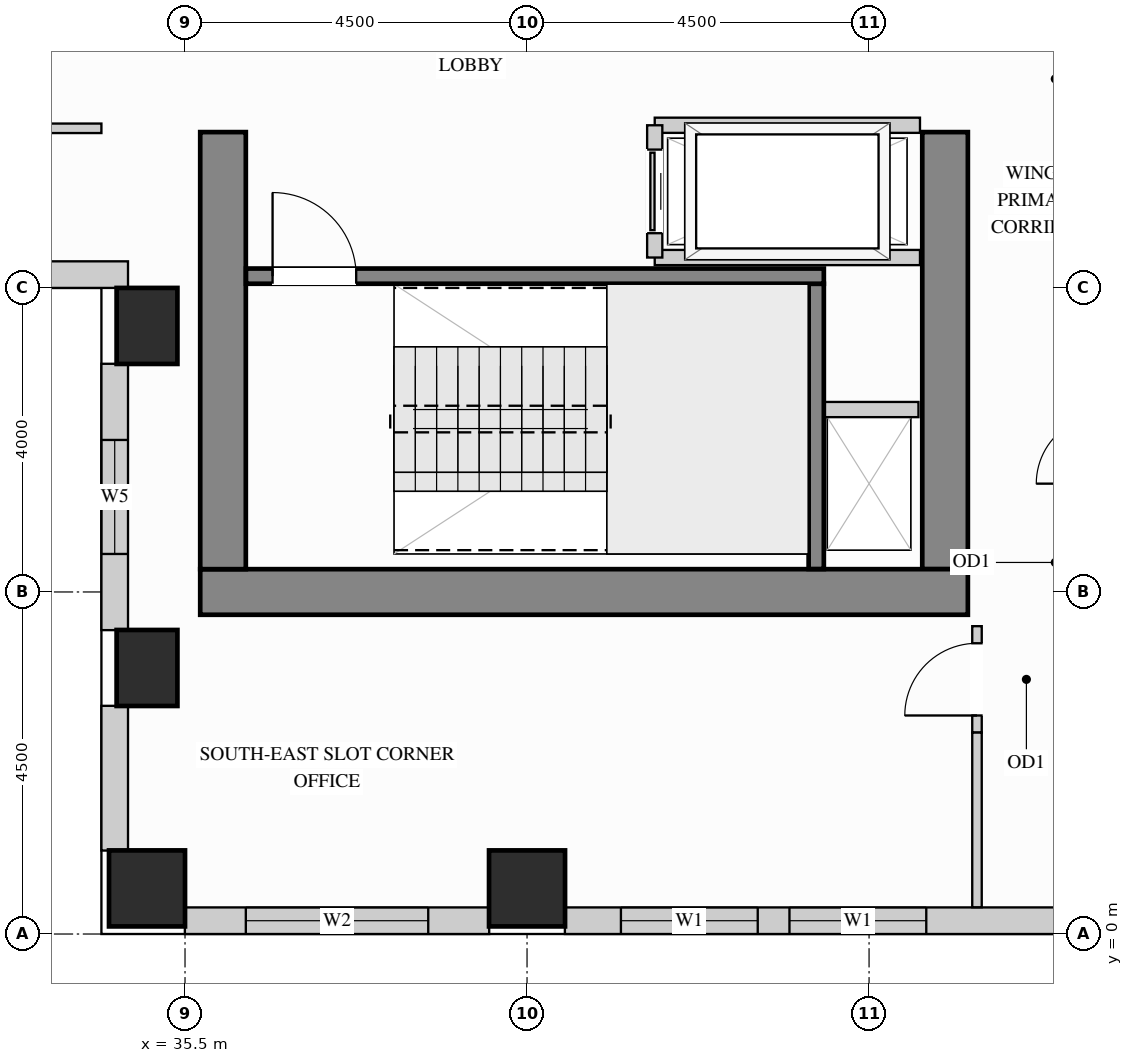
"""IFC4 building model, lengths in metres.
Left out: names, types, materials, properties, quantities, classifications, styles, units other than length and angle.
Written with IfcOpenShell. Run it as: python <this file> out.ifc"""

import sys

from ifc_helpers import new_model, si_unit, direction, frame, frame_2d, origin, origin_2d, place, context, subcontext, project, spatial, rectangle, extrude, source, transform, mapped, element, fill, save


model = new_model("IFC4")
c1 = context("Model", 3, precision=1e-05, world=origin(), true_north=direction((0.0, 1.0)))
c2 = subcontext(c1, "Body", "Model", "MODEL_VIEW")
j1 = project(units=[si_unit("LENGTHUNIT", "METRE"), si_unit("PLANEANGLEUNIT", "RADIAN")], contexts=[c1])
p1 = place(None, origin())
s1 = spatial("IfcSite", under=j1, at=p1, CompositionType="ELEMENT")
p2 = place(p1, origin())
s2 = spatial("IfcBuilding", under=s1, at=p2, CompositionType="ELEMENT")
p3 = place(p2, frame((0.0, 0.0, 157.5)))
s3 = spatial("IfcBuildingStorey", under=s2, at=p3, CompositionType="ELEMENT", Elevation=157.5)
m1 = source(origin(), c2, "Body", "SweptSolid", [
    extrude(rectangle(XDim=0.8, YDim=1.0, at=origin_2d()), origin(), (0.0, 0.0, 1.0), 3.4),
])
for number, where, z_axis, x_axis in (
    (1, (35.0, 3.5, 0.0), (0.0, 0.0, 1.0), (1.0, 0.0, 0.0)),
    (2, (35.0, 8.0, 0.0), (0.0, 0.0, 1.0), (1.0, 0.0, 0.0)),
):
    element("IfcColumn", number, at=place(p3, frame(where, z_axis=z_axis, x_axis=x_axis)), inside=s3, PredefinedType="COLUMN", context=c2, shape_type="MappedRepresentation", body=[
        mapped(m1, transform((0.0, 0.0, 0.0), x_axis=(1.0, 0.0, 0.0), y_axis=(0.0, 1.0, 0.0), z_axis=(0.0, 0.0, 1.0))),
    ])
m2 = source(origin(), c2, "Body", "SweptSolid", [
    extrude(rectangle(XDim=1.0, YDim=1.0, at=origin_2d()), origin(), (0.0, 0.0, 1.0), 3.4),
])
for number, where, z_axis, x_axis in (
    (3, (35.0, 0.6, 0.0), (0.0, 0.0, 1.0), (1.0, 0.0, 0.0)),
    (4, (40.0, 0.6, 0.0), (0.0, 0.0, 1.0), (1.0, 0.0, 0.0)),
):
    element("IfcColumn", number, at=place(p3, frame(where, z_axis=z_axis, x_axis=x_axis)), inside=s3, PredefinedType="COLUMN", context=c2, shape_type="MappedRepresentation", body=[
        mapped(m2, transform((0.0, 0.0, 0.0), x_axis=(1.0, 0.0, 0.0), y_axis=(0.0, 1.0, 0.0), z_axis=(0.0, 0.0, 1.0))),
    ])
m3 = source(origin(), c2, "Body", "SweptSolid", [
    extrude(rectangle(XDim=5.75, YDim=0.6, at=frame_2d((2.875, 0.0))), origin(), (0.0, 0.0, 1.0), 3.4),
])
p4 = place(p3, frame((45.5, 4.8, 0.0), z_axis=(0.0, 0.0, 1.0), x_axis=(0.0, 1.0, 0.0)))
e5 = element("IfcWall", 5, at=p4, inside=s3, PredefinedType="SHEAR", context=c2, shape_type="MappedRepresentation", body=[
    mapped(m3, transform((0.0, 0.0, 0.0), x_axis=(1.0, 0.0, 0.0), y_axis=(0.0, 1.0, 0.0), z_axis=(0.0, 0.0, 1.0))),
])
m4 = source(origin(), c2, "Body", "SweptSolid", [
    extrude(rectangle(XDim=10.1, YDim=0.6, at=frame_2d((5.05, 0.0))), origin(), (0.0, 0.0, 1.0), 3.4),
])
p5 = place(p3, frame((35.7, 4.5, 0.0), z_axis=(0.0, 0.0, 1.0), x_axis=(1.0, 0.0, 0.0)))
e6 = element("IfcWall", 6, at=p5, inside=s3, PredefinedType="SHEAR", context=c2, shape_type="MappedRepresentation", body=[
    mapped(m4, transform((0.0, 0.0, 0.0), x_axis=(1.0, 0.0, 0.0), y_axis=(0.0, 1.0, 0.0), z_axis=(0.0, 0.0, 1.0))),
])
p6 = place(p3, frame((36.0, 4.8, 0.0), z_axis=(0.0, 0.0, 1.0), x_axis=(0.0, 1.0, 0.0)))
e7 = element("IfcWall", 7, at=p6, inside=s3, PredefinedType="SHEAR", context=c2, shape_type="MappedRepresentation", body=[
    mapped(m3, transform((0.0, 0.0, 0.0), x_axis=(1.0, 0.0, 0.0), y_axis=(0.0, 1.0, 0.0), z_axis=(0.0, 0.0, 1.0))),
])
p7 = place(p3, frame((30.898, 8.675, 0.0), z_axis=(0.0, 0.0, 1.0), x_axis=(1.0, 0.0, 0.0)))
e8 = element("IfcWall", 8, at=p7, inside=s3, PredefinedType="SOLIDWALL", context=c2, shape_type="SweptSolid", body=[
    extrude(rectangle(XDim=3.852, YDim=0.35, at=frame_2d((1.926, 0.0))), origin(), (0.0, 0.0, 1.0), 3.385),
])
p8 = place(p7, frame((1.176, 0.0, 0.78)))
e9 = element("IfcOpeningElement", 9, at=p8, cuts=e8, PredefinedType="OPENING", context=c2, shape_type="SweptSolid", body=[
    extrude(rectangle(XDim=1.5, YDim=2.0, at=frame_2d((0.75, 1.0))), frame((0.0, 0.185, 0.0), z_axis=(0.0, -1.0, 0.0), x_axis=(1.0, 0.0, 0.0)), (0.0, 0.0, 1.0), 0.37),
])
p9 = place(p3, frame((34.575, 7.502, 0.0), z_axis=(0.0, 0.0, 1.0), x_axis=(0.0, -1.0, 0.0)))
e10 = element("IfcWall", 10, at=p9, inside=s3, PredefinedType="SOLIDWALL", context=c2, shape_type="SweptSolid", body=[
    extrude(rectangle(XDim=3.504, YDim=0.35, at=frame_2d((1.752, 0.0))), origin(), (0.0, 0.0, 1.0), 2.612),
])
p10 = place(p9, frame((1.002, 0.0, 0.78)))
e11 = element("IfcOpeningElement", 11, at=p10, cuts=e10, PredefinedType="OPENING", context=c2, shape_type="SweptSolid", body=[
    extrude(rectangle(XDim=1.5, YDim=1.652, at=frame_2d((0.75, 0.826))), frame((0.0, 0.185, 0.0), z_axis=(0.0, -1.0, 0.0), x_axis=(1.0, 0.0, 0.0)), (0.0, 0.0, 1.0), 0.37),
])
m5 = source(origin(), c2, "Body", "SweptSolid", [
    extrude(rectangle(XDim=1.904, YDim=0.35, at=frame_2d((0.952, 0.0))), origin(), (0.0, 0.0, 1.0), 2.612),
])
p11 = place(p3, frame((34.575, 3.002, 0.0), z_axis=(0.0, 0.0, 1.0), x_axis=(0.0, -1.0, 0.0)))
e12 = element("IfcWall", 12, at=p11, inside=s3, PredefinedType="SOLIDWALL", context=c2, shape_type="MappedRepresentation", body=[
    mapped(m5, transform((0.0, 0.0, 0.0), x_axis=(1.0, 0.0, 0.0), y_axis=(0.0, 1.0, 0.0), z_axis=(0.0, 0.0, 1.0))),
])
p12 = place(p3, frame((35.498, 0.175, 0.0), z_axis=(0.0, 0.0, 1.0), x_axis=(1.0, 0.0, 0.0)))
e13 = element("IfcWall", 13, at=p12, inside=s3, PredefinedType="SOLIDWALL", context=c2, shape_type="SweptSolid", body=[
    extrude(rectangle(XDim=4.004, YDim=0.35, at=frame_2d((2.002, 0.0))), origin(), (0.0, 0.0, 1.0), 2.612),
])
p13 = place(p12, frame((0.802, 0.0, 0.78)))
e14 = element("IfcOpeningElement", 14, at=p13, cuts=e13, PredefinedType="OPENING", context=c2, shape_type="SweptSolid", body=[
    extrude(rectangle(XDim=2.4, YDim=1.652, at=frame_2d((1.2, 0.826))), frame((0.0, 0.185, 0.0), z_axis=(0.0, -1.0, 0.0), x_axis=(1.0, 0.0, 0.0)), (0.0, 0.0, 1.0), 0.37),
])
p14 = place(p3, frame((40.498, 0.175, 0.0), z_axis=(0.0, 0.0, 1.0), x_axis=(1.0, 0.0, 0.0)))
e15 = element("IfcWall", 15, at=p14, inside=s3, PredefinedType="SOLIDWALL", context=c2, shape_type="SweptSolid", body=[
    extrude(rectangle(XDim=6.604, YDim=0.35, at=frame_2d((3.302, 0.0))), origin(), (0.0, 0.0, 1.0), 2.612),
])
p15 = place(p14, frame((0.737, 0.0, 0.78)))
e16 = element("IfcOpeningElement", 16, at=p15, cuts=e15, PredefinedType="OPENING", context=c2, shape_type="SweptSolid", body=[
    extrude(rectangle(XDim=1.8, YDim=1.652, at=frame_2d((0.9, 0.826))), frame((0.0, 0.185, 0.0), z_axis=(0.0, -1.0, 0.0), x_axis=(1.0, 0.0, 0.0)), (0.0, 0.0, 1.0), 0.37),
])
p16 = place(p14, frame((2.955, 0.0, 0.78)))
e17 = element("IfcOpeningElement", 17, at=p16, cuts=e15, PredefinedType="OPENING", context=c2, shape_type="SweptSolid", body=[
    extrude(rectangle(XDim=1.8, YDim=1.652, at=frame_2d((0.9, 0.826))), frame((0.0, 0.185, 0.0), z_axis=(0.0, -1.0, 0.0), x_axis=(1.0, 0.0, 0.0)), (0.0, 0.0, 1.0), 0.37),
])
p17 = place(p3, frame((45.92, 2.65, 0.0), z_axis=(0.0, 0.0, 1.0), x_axis=(0.0, 1.0, 0.0)))
e18 = element("IfcWall", 18, at=p17, inside=s3, PredefinedType="PARTITIONING", context=c2, shape_type="SweptSolid", body=[
    extrude(rectangle(XDim=1.4, YDim=0.125, at=frame_2d((0.7, 0.0))), origin(), (0.0, 0.0, 1.0), 3.385),
])
p18 = place(p17, frame((0.225, 0.0, 0.0)))
e19 = element("IfcOpeningElement", 19, at=p18, cuts=e18, PredefinedType="OPENING", context=c2, shape_type="SweptSolid", body=[
    extrude(rectangle(XDim=0.95, YDim=2.15, at=frame_2d((0.475, 1.075))), frame((0.0, 0.073, 0.0), z_axis=(0.0, -1.0, 0.0), x_axis=(1.0, 0.0, 0.0)), (0.0, 0.0, 1.0), 0.145),
])
m6 = source(origin(), c2, "Body", "SweptSolid", [
    extrude(rectangle(XDim=2.298, YDim=0.125, at=frame_2d((1.149, 0.0))), origin(), (0.0, 0.0, 1.0), 3.385),
])
p19 = place(p3, frame((45.92, 0.352, 0.0), z_axis=(0.0, 0.0, 1.0), x_axis=(0.0, 1.0, 0.0)))
e20 = element("IfcWall", 20, at=p19, inside=s3, PredefinedType="PARTITIONING", context=c2, shape_type="MappedRepresentation", body=[
    mapped(m6, transform((0.0, 0.0, 0.0), x_axis=(1.0, 0.0, 0.0), y_axis=(0.0, 1.0, 0.0), z_axis=(0.0, 0.0, 1.0))),
])
p20 = place(p3, frame((26.95, 10.6, 0.0), z_axis=(0.0, 0.0, 1.0), x_axis=(1.0, 0.0, 0.0)))
e21 = element("IfcWall", 21, at=p20, inside=s3, PredefinedType="PARTITIONING", context=c2, shape_type="SweptSolid", body=[
    extrude(rectangle(XDim=7.45, YDim=0.125, at=frame_2d((3.725, 0.0))), origin(), (0.0, 0.0, 1.0), 3.385),
])
p21 = place(p20, frame((4.478, 0.0, 0.0)))
e22 = element("IfcOpeningElement", 22, at=p21, cuts=e21, PredefinedType="OPENING", context=c2, shape_type="SweptSolid", body=[
    extrude(rectangle(XDim=0.95, YDim=2.15, at=frame_2d((0.475, 1.075))), frame((0.0, 0.073, 0.0), z_axis=(0.0, -1.0, 0.0), x_axis=(1.0, 0.0, 0.0)), (0.0, 0.0, 1.0), 0.145),
])
m7 = source(origin(), c2, "Body", "SweptSolid", [
    extrude(rectangle(XDim=1.3, YDim=0.2, at=frame_2d((0.65, 0.0))), origin(), (0.0, 0.0, 1.0), 3.385),
])
p22 = place(p3, frame((43.85, 6.9, 0.0), z_axis=(0.0, 0.0, 1.0), x_axis=(1.0, 0.0, 0.0)))
e23 = element("IfcWall", 23, at=p22, inside=s3, PredefinedType="PARTITIONING", context=c2, shape_type="MappedRepresentation", body=[
    mapped(m7, transform((0.0, 0.0, 0.0), x_axis=(1.0, 0.0, 0.0), y_axis=(0.0, 1.0, 0.0), z_axis=(0.0, 0.0, 1.0))),
])
m8 = source(origin(), c2, "Body", "SweptSolid", [
    extrude(rectangle(XDim=3.49, YDim=0.2, at=frame_2d((1.745, 0.0))), origin(), (0.0, 0.0, 1.0), 3.385),
])
for number, where, z_axis, x_axis in (
    (24, (41.68, 10.64, 0.0), (0.0, 0.0, 1.0), (1.0, 0.0, 0.0)),
    (25, (41.68, 8.9, 0.0), (0.0, 0.0, 1.0), (1.0, 0.0, 0.0)),
):
    element("IfcWall", number, at=place(p3, frame(where, z_axis=z_axis, x_axis=x_axis)), inside=s3, PredefinedType="PARTITIONING", context=c2, shape_type="MappedRepresentation", body=[
        mapped(m8, transform((0.0, 0.0, 0.0), x_axis=(1.0, 0.0, 0.0), y_axis=(0.0, 1.0, 0.0), z_axis=(0.0, 0.0, 1.0))),
    ])
p23 = place(p3, frame((41.68, 8.9, 0.0), z_axis=(0.0, 0.0, 1.0), x_axis=(0.0, 1.0, 0.0)))
e26 = element("IfcWall", 26, at=p23, inside=s3, PredefinedType="PARTITIONING", context=c2, shape_type="SweptSolid", body=[
    extrude(rectangle(XDim=1.74, YDim=0.2, at=frame_2d((0.87, 0.0))), origin(), (0.0, 0.0, 1.0), 3.385),
])
p24 = place(p23, frame((0.32, 0.0, 0.0)))
e27 = element("IfcOpeningElement", 27, at=p24, cuts=e26, PredefinedType="OPENING", context=c2, shape_type="SweptSolid", body=[
    extrude(rectangle(XDim=1.1, YDim=2.2, at=frame_2d((0.55, 1.1))), frame((0.0, 0.11, 0.0), z_axis=(0.0, -1.0, 0.0), x_axis=(1.0, 0.0, 0.0)), (0.0, 0.0, 1.0), 0.22),
])
m9 = source(origin(), c2, "Body", "SweptSolid", [
    extrude(rectangle(XDim=3.753, YDim=0.2, at=frame_2d((1.876, 0.0))), origin(), (0.0, 0.0, 1.0), 3.4),
])
p25 = place(p3, frame((43.805, 4.802, 0.0), z_axis=(0.0, 0.0, 1.0), x_axis=(0.0, 1.0, 0.0)))
e28 = element("IfcWall", 28, at=p25, inside=s3, PredefinedType="SHEAR", context=c2, shape_type="MappedRepresentation", body=[
    mapped(m9, transform((0.0, 0.0, 0.0), x_axis=(1.0, 0.0, 0.0), y_axis=(0.0, 1.0, 0.0), z_axis=(0.0, 0.0, 1.0))),
])
p26 = place(p3, frame((36.302, 8.655, 0.0), z_axis=(0.0, 0.0, 1.0), x_axis=(1.0, 0.0, 0.0)))
e29 = element("IfcWall", 29, at=p26, inside=s3, PredefinedType="SHEAR", context=c2, shape_type="SweptSolid", body=[
    extrude(rectangle(XDim=7.603, YDim=0.2, at=frame_2d((3.802, 0.0))), origin(), (0.0, 0.0, 1.0), 3.4),
])
p27 = place(p26, frame((0.35, 0.0, 0.0)))
e30 = element("IfcOpeningElement", 30, at=p27, cuts=e29, PredefinedType="OPENING", context=c2, shape_type="SweptSolid", body=[
    extrude(rectangle(XDim=1.1, YDim=2.15, at=frame_2d((0.55, 1.075))), frame((0.0, 0.11, 0.0), z_axis=(0.0, -1.0, 0.0), x_axis=(1.0, 0.0, 0.0)), (0.0, 0.0, 1.0), 0.22),
])
m10 = source(origin(), c2, "Body", "SweptSolid", [
    extrude(rectangle(XDim=1.1, YDim=2.2, at=frame_2d((0.55, 1.1))), frame((0.0, 0.025, 0.0), z_axis=(0.0, -1.0, 0.0), x_axis=(1.0, 0.0, 0.0)), (0.0, 0.0, 1.0), 0.05),
])
p28 = place(p24, origin())
e31 = element("IfcDoor", 31, at=p28, inside=s3, OperationType="SLIDING_TO_LEFT", PredefinedType="DOOR", context=c2, shape_type="MappedRepresentation", body=[
    mapped(m10, transform((0.0, 0.0, 0.0), x_axis=(1.0, 0.0, 0.0), y_axis=(0.0, 1.0, 0.0), z_axis=(0.0, 0.0, 1.0))),
])
fill(e27, e31)
m11 = source(origin(), c2, "Body", "SweptSolid", [
    extrude(rectangle(XDim=0.95, YDim=2.15, at=frame_2d((0.475, 1.075))), frame((0.0, 0.025, 0.0), z_axis=(0.0, -1.0, 0.0), x_axis=(1.0, 0.0, 0.0)), (0.0, 0.0, 1.0), 0.05),
])
p29 = place(p18, origin())
e32 = element("IfcDoor", 32, at=p29, inside=s3, OperationType="SINGLE_SWING_LEFT", PredefinedType="DOOR", context=c2, shape_type="MappedRepresentation", body=[
    mapped(m11, transform((0.0, 0.0, 0.0), x_axis=(1.0, 0.0, 0.0), y_axis=(0.0, 1.0, 0.0), z_axis=(0.0, 0.0, 1.0))),
])
fill(e19, e32)
m12 = source(origin(), c2, "Body", "SweptSolid", [
    extrude(rectangle(XDim=1.1, YDim=2.15, at=frame_2d((0.55, 1.075))), frame((0.0, 0.025, 0.0), z_axis=(0.0, -1.0, 0.0), x_axis=(1.0, 0.0, 0.0)), (0.0, 0.0, 1.0), 0.05),
])
p30 = place(p27, origin())
e33 = element("IfcDoor", 33, at=p30, inside=s3, OperationType="SINGLE_SWING_LEFT", PredefinedType="DOOR", context=c2, shape_type="MappedRepresentation", body=[
    mapped(m12, transform((0.0, 0.0, 0.0), x_axis=(1.0, 0.0, 0.0), y_axis=(0.0, 1.0, 0.0), z_axis=(0.0, 0.0, 1.0))),
])
fill(e30, e33)
m13 = source(origin(), c2, "Body", "SweptSolid", [
    extrude(rectangle(XDim=1.8, YDim=1.652, at=frame_2d((0.9, 0.826))), frame((0.0, 0.03, 0.0), z_axis=(0.0, -1.0, 0.0), x_axis=(1.0, 0.0, 0.0)), (0.0, 0.0, 1.0), 0.06),
])
p31 = place(p15, origin())
e34 = element("IfcWindow", 34, at=p31, inside=s3, PartitioningType="SINGLE_PANEL", PredefinedType="WINDOW", context=c2, shape_type="MappedRepresentation", body=[
    mapped(m13, transform((0.0, 0.0, 0.0), x_axis=(1.0, 0.0, 0.0), y_axis=(0.0, 1.0, 0.0), z_axis=(0.0, 0.0, 1.0))),
])
fill(e16, e34)
p32 = place(p16, origin())
e35 = element("IfcWindow", 35, at=p32, inside=s3, PartitioningType="SINGLE_PANEL", PredefinedType="WINDOW", context=c2, shape_type="MappedRepresentation", body=[
    mapped(m13, transform((0.0, 0.0, 0.0), x_axis=(1.0, 0.0, 0.0), y_axis=(0.0, 1.0, 0.0), z_axis=(0.0, 0.0, 1.0))),
])
fill(e17, e35)
m14 = source(origin(), c2, "Body", "SweptSolid", [
    extrude(rectangle(XDim=2.4, YDim=1.652, at=frame_2d((1.2, 0.826))), frame((0.0, 0.03, 0.0), z_axis=(0.0, -1.0, 0.0), x_axis=(1.0, 0.0, 0.0)), (0.0, 0.0, 1.0), 0.06),
])
p33 = place(p13, origin())
e36 = element("IfcWindow", 36, at=p33, inside=s3, PartitioningType="SINGLE_PANEL", PredefinedType="WINDOW", context=c2, shape_type="MappedRepresentation", body=[
    mapped(m14, transform((0.0, 0.0, 0.0), x_axis=(1.0, 0.0, 0.0), y_axis=(0.0, 1.0, 0.0), z_axis=(0.0, 0.0, 1.0))),
])
fill(e14, e36)
m15 = source(origin(), c2, "Body", "SweptSolid", [
    extrude(rectangle(XDim=1.5, YDim=1.652, at=frame_2d((0.75, 0.826))), frame((0.0, 0.03, 0.0), z_axis=(0.0, -1.0, 0.0), x_axis=(1.0, 0.0, 0.0)), (0.0, 0.0, 1.0), 0.06),
])
p34 = place(p10, origin())
e37 = element("IfcWindow", 37, at=p34, inside=s3, PartitioningType="SINGLE_PANEL", PredefinedType="WINDOW", context=c2, shape_type="MappedRepresentation", body=[
    mapped(m15, transform((0.0, 0.0, 0.0), x_axis=(1.0, 0.0, 0.0), y_axis=(0.0, 1.0, 0.0), z_axis=(0.0, 0.0, 1.0))),
])
fill(e11, e37)
save(model, sys.argv[1])
